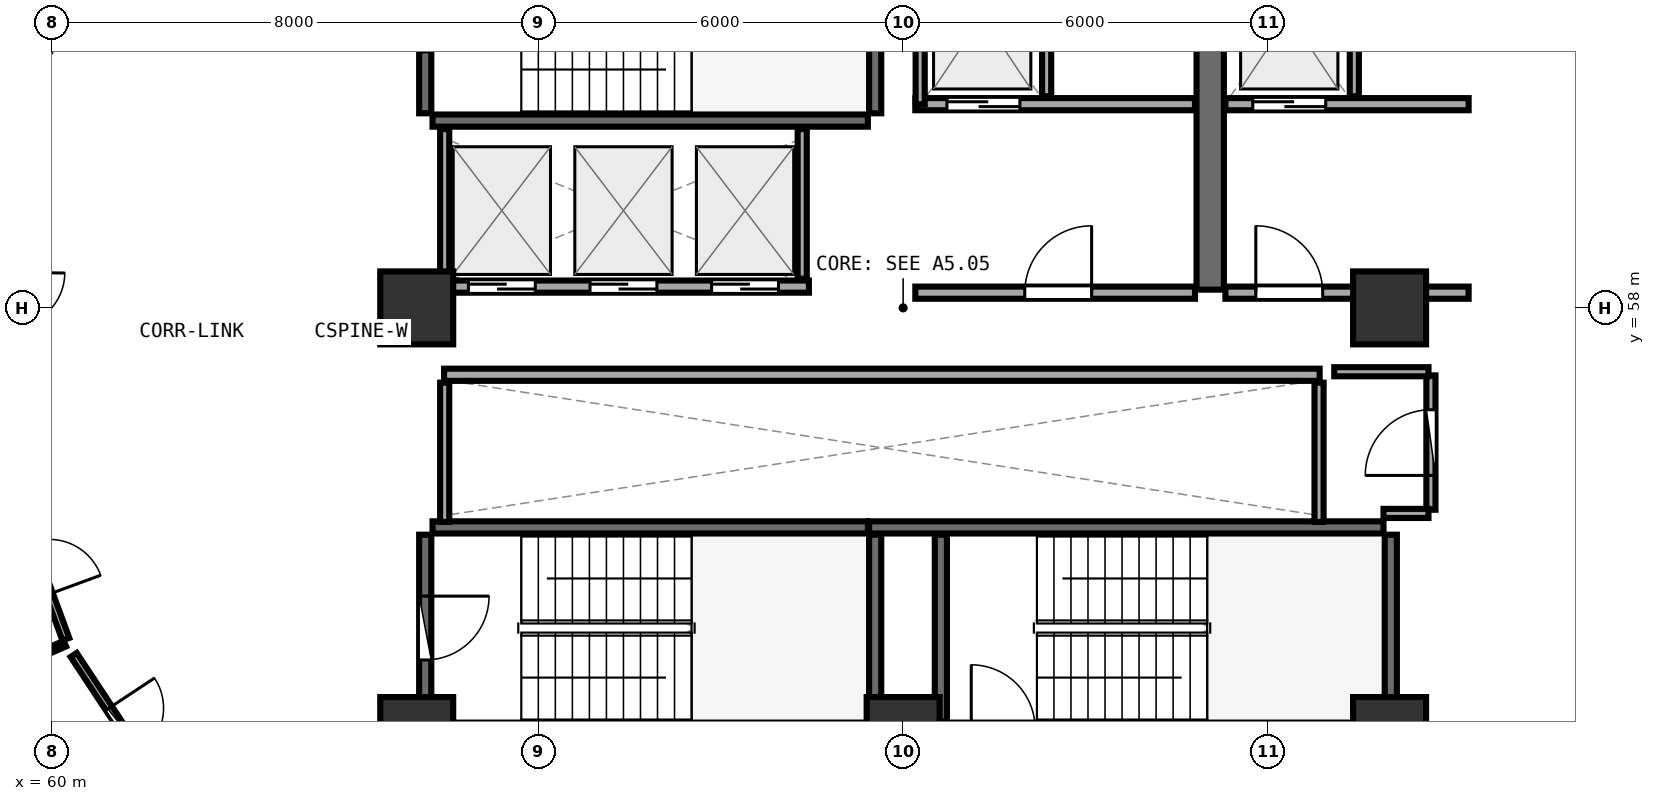
"""IFC4 building model, lengths in metres.
Left out: names, types, materials, properties, quantities, classifications, styles, units other than length and angle.
Written with IfcOpenShell. Run it as: python <this file> out.ifc"""

import sys

from ifc_helpers import new_model, si_unit, direction, frame, frame_2d, origin, origin_2d, place, context, subcontext, project, spatial, rectangle, extrude, element, fill, save


model = new_model("IFC4")
c1 = context("Model", 3, precision=1e-05, world=origin(), true_north=direction((0.0, 1.0)))
c2 = subcontext(c1, "Body", "Model", "MODEL_VIEW")
j1 = project(units=[si_unit("LENGTHUNIT", "METRE"), si_unit("PLANEANGLEUNIT", "RADIAN")], contexts=[c1])
p1 = place(None, origin())
s1 = spatial("IfcSite", under=j1, at=p1, CompositionType="ELEMENT")
p2 = place(p1, origin())
s2 = spatial("IfcBuilding", under=s1, at=p2, CompositionType="ELEMENT")
p3 = place(p2, frame((0.0, 0.0, 121.35)))
s3 = spatial("IfcBuildingStorey", under=s2, at=p3, CompositionType="ELEMENT", Elevation=121.35)
for number, where, z_axis, x_axis in (
    (1, (66.0, 51.0, 0.0), (0.0, 0.0, 1.0), (1.0, 0.0, 0.0)),
    (2, (74.0, 51.0, 0.0), (0.0, 0.0, 1.0), (1.0, 0.0, 0.0)),
    (3, (82.0, 51.0, 0.0), (0.0, 0.0, 1.0), (1.0, 0.0, 0.0)),
    (4, (82.0, 58.0, 0.0), (0.0, 0.0, 1.0), (1.0, 0.0, 0.0)),
    (5, (66.0, 58.0, 0.0), (0.0, 0.0, 1.0), (1.0, 0.0, 0.0)),
):
    element("IfcColumn", number, at=place(p3, frame(where, z_axis=z_axis, x_axis=x_axis)), inside=s3, PredefinedType="PILASTER", context=c2, shape_type="SweptSolid", body=[
        extrude(rectangle(XDim=1.2, YDim=1.2, at=origin_2d()), origin(), (0.0, 0.0, 1.0), 3.75),
    ])
p4 = place(p3, frame((66.26, 61.08, 0.0), z_axis=(0.0, 0.0, 1.0), x_axis=(1.0, 0.0, 0.0)))
e6 = element("IfcWall", 6, at=p4, inside=s3, PredefinedType="SHEAR", context=c2, shape_type="SweptSolid", body=[
    extrude(rectangle(XDim=7.16, YDim=0.2, at=frame_2d((3.58, 0.0))), origin(), (0.0, 0.0, 1.0), 3.49),
])
p5 = place(p3, frame((73.54, 61.2, 0.0), z_axis=(0.0, 0.0, 1.0), x_axis=(0.0, 1.0, 0.0)))
e7 = element("IfcWall", 7, at=p5, inside=s3, PredefinedType="SHEAR", context=c2, shape_type="SweptSolid", body=[
    extrude(rectangle(XDim=3.07, YDim=0.2, at=frame_2d((1.535, 0.0))), origin(), (0.0, 0.0, 1.0), 3.49),
])
p6 = place(p3, frame((66.14, 64.27, 0.0), z_axis=(0.0, 0.0, 1.0), x_axis=(0.0, -1.0, 0.0)))
e8 = element("IfcWall", 8, at=p6, inside=s3, PredefinedType="SHEAR", context=c2, shape_type="SweptSolid", body=[
    extrude(rectangle(XDim=3.07, YDim=0.2, at=frame_2d((1.535, 0.0))), origin(), (0.0, 0.0, 1.0), 3.49),
])
p7 = place(p6, frame((1.01, 0.0, 0.0)))
e9 = element("IfcOpeningElement", 9, at=p7, cuts=e8, PredefinedType="OPENING", context=c2, shape_type="SweptSolid", body=[
    extrude(rectangle(XDim=1.05, YDim=2.1, at=frame_2d((0.525, 1.05))), frame((0.0, 0.11, 0.0), z_axis=(0.0, -1.0, 0.0), x_axis=(1.0, 0.0, 0.0)), (0.0, 0.0, 1.0), 0.22),
])
p8 = place(p3, frame((82.02, 51.2, 0.0), z_axis=(0.0, 0.0, 1.0), x_axis=(0.0, 1.0, 0.0)))
e10 = element("IfcWall", 10, at=p8, inside=s3, PredefinedType="SHEAR", context=c2, shape_type="SweptSolid", body=[
    extrude(rectangle(XDim=3.07, YDim=0.2, at=frame_2d((1.535, 0.0))), origin(), (0.0, 0.0, 1.0), 3.49),
])
p9 = place(p3, frame((81.9, 54.39, 0.0), z_axis=(0.0, 0.0, 1.0), x_axis=(-1.0, 0.0, 0.0)))
e11 = element("IfcWall", 11, at=p9, inside=s3, PredefinedType="SHEAR", context=c2, shape_type="SweptSolid", body=[
    extrude(rectangle(XDim=8.46, YDim=0.2, at=frame_2d((4.23, 0.0))), origin(), (0.0, 0.0, 1.0), 3.49),
])
for number, where, z_axis, x_axis in (
    (12, (74.62, 54.27, 0.0), (0.0, 0.0, 1.0), (0.0, -1.0, 0.0)),
    (13, (73.54, 51.2, 0.0), (0.0, 0.0, 1.0), (0.0, 1.0, 0.0)),
):
    element("IfcWall", number, at=place(p3, frame(where, z_axis=z_axis, x_axis=x_axis)), inside=s3, PredefinedType="SHEAR", context=c2, shape_type="SweptSolid", body=[
        extrude(rectangle(XDim=3.07, YDim=0.2, at=frame_2d((1.535, 0.0))), origin(), (0.0, 0.0, 1.0), 3.49),
    ])
p10 = place(p3, frame((73.42, 54.39, 0.0), z_axis=(0.0, 0.0, 1.0), x_axis=(-1.0, 0.0, 0.0)))
e14 = element("IfcWall", 14, at=p10, inside=s3, PredefinedType="SHEAR", context=c2, shape_type="SweptSolid", body=[
    extrude(rectangle(XDim=7.16, YDim=0.2, at=frame_2d((3.58, 0.0))), origin(), (0.0, 0.0, 1.0), 3.49),
])
p11 = place(p3, frame((66.14, 54.27, 0.0), z_axis=(0.0, 0.0, 1.0), x_axis=(0.0, -1.0, 0.0)))
e15 = element("IfcWall", 15, at=p11, inside=s3, PredefinedType="SHEAR", context=c2, shape_type="SweptSolid", body=[
    extrude(rectangle(XDim=3.07, YDim=0.2, at=frame_2d((1.535, 0.0))), origin(), (0.0, 0.0, 1.0), 3.49),
])
p12 = place(p11, frame((1.01, 0.0, 0.0)))
e16 = element("IfcOpeningElement", 16, at=p12, cuts=e15, PredefinedType="OPENING", context=c2, shape_type="SweptSolid", body=[
    extrude(rectangle(XDim=1.05, YDim=2.1, at=frame_2d((0.525, 1.05))), frame((0.0, 0.11, 0.0), z_axis=(0.0, -1.0, 0.0), x_axis=(1.0, 0.0, 0.0)), (0.0, 0.0, 1.0), 0.22),
])
p13 = place(p3, frame((79.05, 58.3, 0.0), z_axis=(0.0, 0.0, 1.0), x_axis=(0.0, 1.0, 0.0)))
e17 = element("IfcWall", 17, at=p13, inside=s3, PredefinedType="SHEAR", context=c2, shape_type="SweptSolid", body=[
    extrude(rectangle(XDim=6.3, YDim=0.45, at=frame_2d((3.15, 0.0))), origin(), (0.0, 0.0, 1.0), 3.49),
])
p14 = place(p3, frame((74.2, 61.35, 0.0), z_axis=(0.0, 0.0, 1.0), x_axis=(1.0, 0.0, 0.0)))
e18 = element("IfcWall", 18, at=p14, inside=s3, PredefinedType="SOLIDWALL", context=c2, shape_type="SweptSolid", body=[
    extrude(rectangle(XDim=4.6, YDim=0.2, at=frame_2d((2.3, 0.0))), origin(), (0.0, 0.0, 1.0), 3.48),
])
p15 = place(p14, frame((0.52, 0.0, 0.0)))
e19 = element("IfcOpeningElement", 19, at=p15, cuts=e18, PredefinedType="OPENING", context=c2, shape_type="SweptSolid", body=[
    extrude(rectangle(XDim=1.2, YDim=2.15, at=frame_2d((0.6, 1.075))), frame((0.0, 0.11, 0.0), z_axis=(0.0, -1.0, 0.0), x_axis=(1.0, 0.0, 0.0)), (0.0, 0.0, 1.0), 0.22),
])
p16 = place(p3, frame((74.28, 61.35, 0.0), z_axis=(0.0, 0.0, 1.0), x_axis=(0.0, 1.0, 0.0)))
e20 = element("IfcWall", 20, at=p16, inside=s3, PredefinedType="PARTITIONING", context=c2, shape_type="SweptSolid", body=[
    extrude(rectangle(XDim=2.97, YDim=0.15, at=frame_2d((1.485, 0.0))), origin(), (0.0, 0.0, 1.0), 3.48),
])
p17 = place(p3, frame((76.36, 61.48, 0.0), z_axis=(0.0, 0.0, 1.0), x_axis=(0.0, 1.0, 0.0)))
e21 = element("IfcWall", 21, at=p17, inside=s3, PredefinedType="PARTITIONING", context=c2, shape_type="SweptSolid", body=[
    extrude(rectangle(XDim=2.84, YDim=0.15, at=frame_2d((1.42, 0.0))), origin(), (0.0, 0.0, 1.0), 3.48),
])
p18 = place(p3, frame((79.3, 61.35, 0.0), z_axis=(0.0, 0.0, 1.0), x_axis=(1.0, 0.0, 0.0)))
e22 = element("IfcWall", 22, at=p18, inside=s3, PredefinedType="SOLIDWALL", context=c2, shape_type="SweptSolid", body=[
    extrude(rectangle(XDim=4.0, YDim=0.2, at=frame_2d((2.0, 0.0))), origin(), (0.0, 0.0, 1.0), 2.775),
])
p19 = place(p18, frame((0.45, 0.0, 0.0)))
e23 = element("IfcOpeningElement", 23, at=p19, cuts=e22, PredefinedType="OPENING", context=c2, shape_type="SweptSolid", body=[
    extrude(rectangle(XDim=1.2, YDim=2.15, at=frame_2d((0.6, 1.075))), frame((0.0, 0.11, 0.0), z_axis=(0.0, -1.0, 0.0), x_axis=(1.0, 0.0, 0.0)), (0.0, 0.0, 1.0), 0.22),
])
p20 = place(p3, frame((81.42, 61.48, 0.0), z_axis=(0.0, 0.0, 1.0), x_axis=(0.0, 1.0, 0.0)))
e24 = element("IfcWall", 24, at=p20, inside=s3, PredefinedType="PARTITIONING", context=c2, shape_type="SweptSolid", body=[
    extrude(rectangle(XDim=2.84, YDim=0.15, at=frame_2d((1.42, 0.0))), origin(), (0.0, 0.0, 1.0), 3.48),
])
p21 = place(p3, frame((74.2, 58.25, 0.0), z_axis=(0.0, 0.0, 1.0), x_axis=(1.0, 0.0, 0.0)))
e25 = element("IfcWall", 25, at=p21, inside=s3, PredefinedType="SOLIDWALL", context=c2, shape_type="SweptSolid", body=[
    extrude(rectangle(XDim=4.6, YDim=0.2, at=frame_2d((2.3, 0.0))), origin(), (0.0, 0.0, 1.0), 3.48),
])
p22 = place(p21, frame((1.8, 0.0, 0.0)))
e26 = element("IfcOpeningElement", 26, at=p22, cuts=e25, PredefinedType="OPENING", context=c2, shape_type="SweptSolid", body=[
    extrude(rectangle(XDim=1.1, YDim=2.1, at=frame_2d((0.55, 1.05))), frame((0.0, 0.11, 0.0), z_axis=(0.0, -1.0, 0.0), x_axis=(1.0, 0.0, 0.0)), (0.0, 0.0, 1.0), 0.22),
])
p23 = place(p3, frame((79.3, 58.25, 0.0), z_axis=(0.0, 0.0, 1.0), x_axis=(1.0, 0.0, 0.0)))
e27 = element("IfcWall", 27, at=p23, inside=s3, PredefinedType="SOLIDWALL", context=c2, shape_type="SweptSolid", body=[
    extrude(rectangle(XDim=4.0, YDim=0.2, at=frame_2d((2.0, 0.0))), origin(), (0.0, 0.0, 1.0), 2.775),
])
p24 = place(p23, frame((0.5, 0.0, 0.0)))
e28 = element("IfcOpeningElement", 28, at=p24, cuts=e27, PredefinedType="OPENING", context=c2, shape_type="SweptSolid", body=[
    extrude(rectangle(XDim=1.1, YDim=2.1, at=frame_2d((0.55, 1.05))), frame((0.0, 0.11, 0.0), z_axis=(0.0, -1.0, 0.0), x_axis=(1.0, 0.0, 0.0)), (0.0, 0.0, 1.0), 0.22),
])
p25 = place(p3, frame((66.45, 58.35, 0.0), z_axis=(0.0, 0.0, 1.0), x_axis=(1.0, 0.0, 0.0)))
e29 = element("IfcWall", 29, at=p25, inside=s3, PredefinedType="SOLIDWALL", context=c2, shape_type="SweptSolid", body=[
    extrude(rectangle(XDim=6.0, YDim=0.2, at=frame_2d((3.0, 0.0))), origin(), (0.0, 0.0, 1.0), 3.48),
])
p26 = place(p25, frame((0.4, 0.0, 0.0)))
e30 = element("IfcOpeningElement", 30, at=p26, cuts=e29, PredefinedType="OPENING", context=c2, shape_type="SweptSolid", body=[
    extrude(rectangle(XDim=1.1, YDim=2.1, at=frame_2d((0.55, 1.05))), frame((0.0, 0.11, 0.0), z_axis=(0.0, -1.0, 0.0), x_axis=(1.0, 0.0, 0.0)), (0.0, 0.0, 1.0), 0.22),
])
p27 = place(p25, frame((2.4, 0.0, 0.0)))
e31 = element("IfcOpeningElement", 31, at=p27, cuts=e29, PredefinedType="OPENING", context=c2, shape_type="SweptSolid", body=[
    extrude(rectangle(XDim=1.1, YDim=2.1, at=frame_2d((0.55, 1.05))), frame((0.0, 0.11, 0.0), z_axis=(0.0, -1.0, 0.0), x_axis=(1.0, 0.0, 0.0)), (0.0, 0.0, 1.0), 0.22),
])
p28 = place(p25, frame((4.4, 0.0, 0.0)))
e32 = element("IfcOpeningElement", 32, at=p28, cuts=e29, PredefinedType="OPENING", context=c2, shape_type="SweptSolid", body=[
    extrude(rectangle(XDim=1.1, YDim=2.1, at=frame_2d((0.55, 1.05))), frame((0.0, 0.11, 0.0), z_axis=(0.0, -1.0, 0.0), x_axis=(1.0, 0.0, 0.0)), (0.0, 0.0, 1.0), 0.22),
])
for number, where, z_axis, x_axis in (
    (33, (66.46, 58.48, 0.0), (0.0, 0.0, 1.0), (0.0, 1.0, 0.0)),
    (34, (72.34, 58.48, 0.0), (0.0, 0.0, 1.0), (0.0, 1.0, 0.0)),
):
    element("IfcWall", number, at=place(p3, frame(where, z_axis=z_axis, x_axis=x_axis)), inside=s3, PredefinedType="PARTITIONING", context=c2, shape_type="SweptSolid", body=[
        extrude(rectangle(XDim=2.46, YDim=0.15, at=frame_2d((1.23, 0.0))), origin(), (0.0, 0.0, 1.0), 3.48),
    ])
p29 = place(p3, frame((66.45, 56.9, 0.0), z_axis=(0.0, 0.0, 1.0), x_axis=(1.0, 0.0, 0.0)))
e35 = element("IfcWall", 35, at=p29, inside=s3, PredefinedType="SOLIDWALL", context=c2, shape_type="SweptSolid", body=[
    extrude(rectangle(XDim=14.4, YDim=0.2, at=frame_2d((7.2, 0.0))), origin(), (0.0, 0.0, 1.0), 3.48),
])
for number, where, z_axis, x_axis in (
    (36, (66.46, 54.48, 0.0), (0.0, 0.0, 1.0), (0.0, 1.0, 0.0)),
    (37, (80.84, 54.48, 0.0), (0.0, 0.0, 1.0), (0.0, 1.0, 0.0)),
):
    element("IfcWall", number, at=place(p3, frame(where, z_axis=z_axis, x_axis=x_axis)), inside=s3, PredefinedType="PARTITIONING", context=c2, shape_type="SweptSolid", body=[
        extrude(rectangle(XDim=2.29, YDim=0.15, at=frame_2d((1.145, 0.0))), origin(), (0.0, 0.0, 1.0), 3.48),
    ])
p30 = place(p3, frame((82.68, 54.68, 0.0), z_axis=(0.0, 0.0, 1.0), x_axis=(0.0, 1.0, 0.0)))
e38 = element("IfcWall", 38, at=p30, inside=s3, PredefinedType="PARTITIONING", context=c2, shape_type="SweptSolid", body=[
    extrude(rectangle(XDim=2.21, YDim=0.15, at=frame_2d((1.105, 0.0))), origin(), (0.0, 0.0, 1.0), 3.48),
])
p31 = place(p30, frame((0.565, 0.0, 0.0)))
e39 = element("IfcOpeningElement", 39, at=p31, cuts=e38, PredefinedType="OPENING", context=c2, shape_type="SweptSolid", body=[
    extrude(rectangle(XDim=1.08, YDim=2.1, at=frame_2d((0.54, 1.05))), frame((0.0, 0.085, 0.0), z_axis=(0.0, -1.0, 0.0), x_axis=(1.0, 0.0, 0.0)), (0.0, 0.0, 1.0), 0.17),
])
p32 = place(p3, frame((62.199, 66.421, 0.0), z_axis=(0.0, 0.0, 1.0), x_axis=(-0.478256103777, -0.878220416069, 0.0)))
e40 = element("IfcWall", 40, at=p32, inside=s3, PredefinedType="PARTITIONING", context=c2, shape_type="SweptSolid", body=[
    extrude(rectangle(XDim=5.741, YDim=0.12, at=frame_2d((2.871, 0.0))), origin(), (0.0, 0.0, 1.0), 2.925),
])
p33 = place(p32, frame((2.42, 0.0, 0.0)))
e41 = element("IfcOpeningElement", 41, at=p33, cuts=e40, PredefinedType="OPENING", context=c2, shape_type="SweptSolid", body=[
    extrude(rectangle(XDim=0.9, YDim=2.08, at=frame_2d((0.45, 1.04))), frame((0.0, 0.07, 0.0), z_axis=(0.0, -1.0, 0.0), x_axis=(1.0, 0.0, 0.0)), (0.0, 0.0, 1.0), 0.14),
])
p34 = place(p3, frame((59.375, 54.881, 0.0), z_axis=(0.0, 0.0, 1.0), x_axis=(0.344396316594, -0.938824359035, 0.0)))
e42 = element("IfcWall", 42, at=p34, inside=s3, PredefinedType="PARTITIONING", context=c2, shape_type="SweptSolid", body=[
    extrude(rectangle(XDim=2.481, YDim=0.12, at=frame_2d((1.241, 0.0))), origin(), (0.0, 0.0, 1.0), 3.235),
])
p35 = place(p34, frame((0.791, 0.0, 0.0)))
e43 = element("IfcOpeningElement", 43, at=p35, cuts=e42, PredefinedType="OPENING", context=c2, shape_type="SweptSolid", body=[
    extrude(rectangle(XDim=0.9, YDim=2.08, at=frame_2d((0.45, 1.04))), frame((0.0, 0.07, 0.0), z_axis=(0.0, -1.0, 0.0), x_axis=(1.0, 0.0, 0.0)), (0.0, 0.0, 1.0), 0.14),
])
p36 = place(p3, frame((60.358, 52.293, 0.0), z_axis=(0.0, 0.0, 1.0), x_axis=(0.551050840628, -0.834471671804, 0.0)))
e44 = element("IfcWall", 44, at=p36, inside=s3, PredefinedType="PARTITIONING", context=c2, shape_type="SweptSolid", body=[
    extrude(rectangle(XDim=3.0, YDim=0.12, at=frame_2d((1.5, 0.0))), origin(), (0.0, 0.0, 1.0), 2.925),
])
p37 = place(p36, frame((1.05, 0.0, 0.0)))
e45 = element("IfcOpeningElement", 45, at=p37, cuts=e44, PredefinedType="OPENING", context=c2, shape_type="SweptSolid", body=[
    extrude(rectangle(XDim=0.9, YDim=2.08, at=frame_2d((0.45, 1.04))), frame((0.0, 0.07, 0.0), z_axis=(0.0, -1.0, 0.0), x_axis=(1.0, 0.0, 0.0)), (0.0, 0.0, 1.0), 0.14),
])
p38 = place(p3, frame((81.9, 54.62, 0.0), z_axis=(0.0, 0.0, 1.0), x_axis=(1.0, 0.0, 0.0)))
e46 = element("IfcWall", 46, at=p38, inside=s3, PredefinedType="PARTITIONING", context=c2, shape_type="SweptSolid", body=[
    extrude(rectangle(XDim=0.74, YDim=0.15, at=frame_2d((0.37, 0.0))), origin(), (0.0, 0.0, 1.0), 2.775),
])
p39 = place(p3, frame((82.64, 56.95, 0.0), z_axis=(0.0, 0.0, 1.0), x_axis=(-1.0, 0.0, 0.0)))
e47 = element("IfcWall", 47, at=p39, inside=s3, PredefinedType="PARTITIONING", context=c2, shape_type="SweptSolid", body=[
    extrude(rectangle(XDim=1.55, YDim=0.15, at=frame_2d((0.775, 0.0))), origin(), (0.0, 0.0, 1.0), 2.775),
])
p40 = place(p3, frame((60.213, 52.479, 0.0), z_axis=(0.0, 0.0, 1.0), x_axis=(-0.914847920866, -0.403798565732, 0.0)))
e48 = element("IfcWall", 48, at=p40, inside=s3, PredefinedType="PARTITIONING", context=c2, shape_type="SweptSolid", body=[
    extrude(rectangle(XDim=3.719, YDim=0.1, at=frame_2d((1.86, 0.0))), origin(), (0.0, 0.0, 1.0), 3.175),
])
p41 = place(p12, origin())
e49 = element("IfcDoor", 49, at=p41, inside=s3, OperationType="SINGLE_SWING_LEFT", PredefinedType="DOOR", context=c2, shape_type="SweptSolid", body=[
    extrude(rectangle(XDim=1.05, YDim=2.1, at=frame_2d((0.525, 1.05))), frame((0.0, 0.025, 0.0), z_axis=(0.0, -1.0, 0.0), x_axis=(1.0, 0.0, 0.0)), (0.0, 0.0, 1.0), 0.05),
])
fill(e16, e49)
p42 = place(p15, origin())
e50 = element("IfcDoor", 50, at=p42, inside=s3, OperationType="DOUBLE_DOOR_SLIDING", PredefinedType="DOOR", context=c2, shape_type="SweptSolid", body=[
    extrude(rectangle(XDim=1.2, YDim=2.15, at=frame_2d((0.6, 1.075))), frame((0.0, 0.025, 0.0), z_axis=(0.0, -1.0, 0.0), x_axis=(1.0, 0.0, 0.0)), (0.0, 0.0, 1.0), 0.05),
])
fill(e19, e50)
p43 = place(p19, origin())
e51 = element("IfcDoor", 51, at=p43, inside=s3, OperationType="DOUBLE_DOOR_SLIDING", PredefinedType="DOOR", context=c2, shape_type="SweptSolid", body=[
    extrude(rectangle(XDim=1.2, YDim=2.15, at=frame_2d((0.6, 1.075))), frame((0.0, 0.025, 0.0), z_axis=(0.0, -1.0, 0.0), x_axis=(1.0, 0.0, 0.0)), (0.0, 0.0, 1.0), 0.05),
])
fill(e23, e51)
p44 = place(p22, frame((1.1, 0.0, 0.0), z_axis=(0.0, 0.0, 1.0), x_axis=(-1.0, 0.0, 0.0)))
e52 = element("IfcDoor", 52, at=p44, inside=s3, OperationType="SINGLE_SWING_LEFT", PredefinedType="DOOR", context=c2, shape_type="SweptSolid", body=[
    extrude(rectangle(XDim=1.1, YDim=2.1, at=frame_2d((0.55, 1.05))), frame((0.0, 0.025, 0.0), z_axis=(0.0, -1.0, 0.0), x_axis=(1.0, 0.0, 0.0)), (0.0, 0.0, 1.0), 0.05),
])
fill(e26, e52)
p45 = place(p24, frame((1.1, 0.0, 0.0), z_axis=(0.0, 0.0, 1.0), x_axis=(-1.0, 0.0, 0.0)))
e53 = element("IfcDoor", 53, at=p45, inside=s3, OperationType="SINGLE_SWING_RIGHT", PredefinedType="DOOR", context=c2, shape_type="SweptSolid", body=[
    extrude(rectangle(XDim=1.1, YDim=2.1, at=frame_2d((0.55, 1.05))), frame((0.0, 0.025, 0.0), z_axis=(0.0, -1.0, 0.0), x_axis=(1.0, 0.0, 0.0)), (0.0, 0.0, 1.0), 0.05),
])
fill(e28, e53)
p46 = place(p26, origin())
e54 = element("IfcDoor", 54, at=p46, inside=s3, OperationType="DOUBLE_DOOR_SLIDING", PredefinedType="DOOR", context=c2, shape_type="SweptSolid", body=[
    extrude(rectangle(XDim=1.1, YDim=2.1, at=frame_2d((0.55, 1.05))), frame((0.0, 0.025, 0.0), z_axis=(0.0, -1.0, 0.0), x_axis=(1.0, 0.0, 0.0)), (0.0, 0.0, 1.0), 0.05),
])
fill(e30, e54)
p47 = place(p27, origin())
e55 = element("IfcDoor", 55, at=p47, inside=s3, OperationType="DOUBLE_DOOR_SLIDING", PredefinedType="DOOR", context=c2, shape_type="SweptSolid", body=[
    extrude(rectangle(XDim=1.1, YDim=2.1, at=frame_2d((0.55, 1.05))), frame((0.0, 0.025, 0.0), z_axis=(0.0, -1.0, 0.0), x_axis=(1.0, 0.0, 0.0)), (0.0, 0.0, 1.0), 0.05),
])
fill(e31, e55)
p48 = place(p28, origin())
e56 = element("IfcDoor", 56, at=p48, inside=s3, OperationType="DOUBLE_DOOR_SLIDING", PredefinedType="DOOR", context=c2, shape_type="SweptSolid", body=[
    extrude(rectangle(XDim=1.1, YDim=2.1, at=frame_2d((0.55, 1.05))), frame((0.0, 0.025, 0.0), z_axis=(0.0, -1.0, 0.0), x_axis=(1.0, 0.0, 0.0)), (0.0, 0.0, 1.0), 0.05),
])
fill(e32, e56)
p49 = place(p31, origin())
e57 = element("IfcDoor", 57, at=p49, inside=s3, OperationType="SINGLE_SWING_LEFT", PredefinedType="DOOR", context=c2, shape_type="SweptSolid", body=[
    extrude(rectangle(XDim=1.08, YDim=2.1, at=frame_2d((0.54, 1.05))), frame((0.0, 0.025, 0.0), z_axis=(0.0, -1.0, 0.0), x_axis=(1.0, 0.0, 0.0)), (0.0, 0.0, 1.0), 0.05),
])
fill(e39, e57)
p50 = place(p37, origin())
e58 = element("IfcDoor", 58, at=p50, inside=s3, OperationType="SINGLE_SWING_LEFT", PredefinedType="DOOR", context=c2, shape_type="SweptSolid", body=[
    extrude(rectangle(XDim=0.9, YDim=2.08, at=frame_2d((0.45, 1.04))), frame((0.0, 0.025, 0.0), z_axis=(0.0, -1.0, 0.0), x_axis=(1.0, 0.0, 0.0)), (0.0, 0.0, 1.0), 0.05),
])
fill(e45, e58)
save(model, sys.argv[1])
